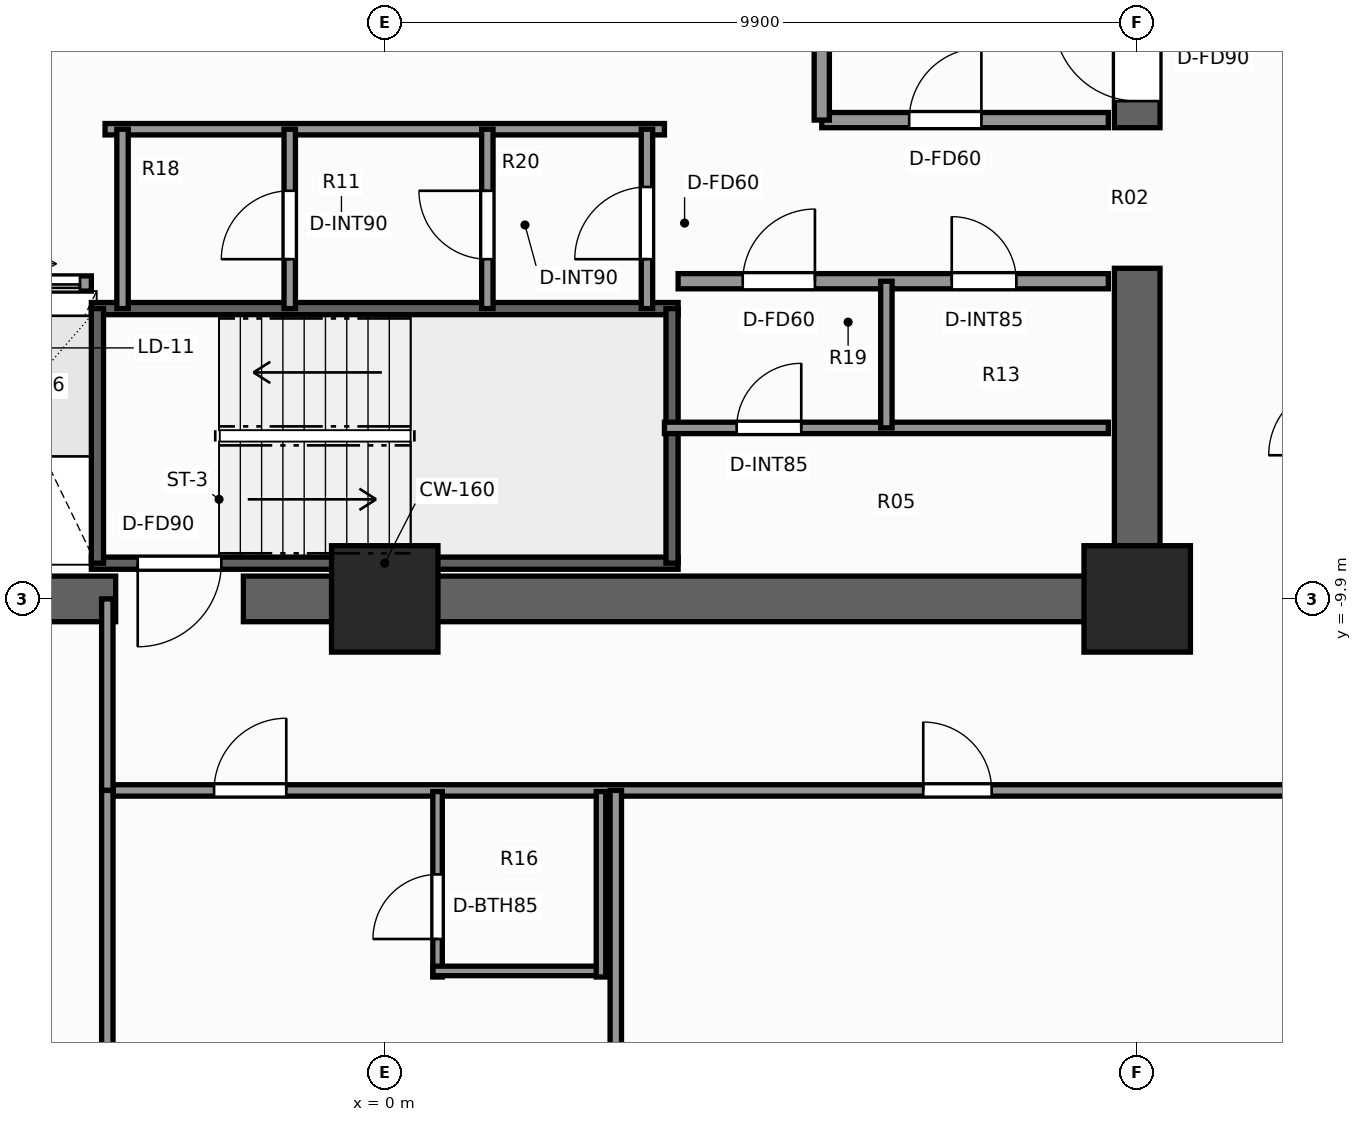
"""IFC4 building model, lengths in metres.
Left out: names, types, materials, properties, quantities, classifications, styles, units other than length and angle.
Written with IfcOpenShell. Run it as: python <this file> out.ifc"""

import sys

from ifc_helpers import new_model, si_unit, direction, frame, frame_2d, origin, origin_2d, place, context, subcontext, project, spatial, rectangle, extrude, element, fill, save


model = new_model("IFC4")
c1 = context("Model", 3, precision=1e-05, world=origin(), true_north=direction((0.0, 1.0)))
c2 = subcontext(c1, "Body", "Model", "MODEL_VIEW")
j1 = project(units=[si_unit("LENGTHUNIT", "METRE"), si_unit("PLANEANGLEUNIT", "RADIAN")], contexts=[c1])
p1 = place(None, origin())
s1 = spatial("IfcSite", under=j1, at=p1, CompositionType="ELEMENT")
p2 = place(p1, origin())
s2 = spatial("IfcBuilding", under=s1, at=p2, CompositionType="ELEMENT")
p3 = place(p2, frame((0.0, 0.0, 82.1)))
s3 = spatial("IfcBuildingStorey", under=s2, at=p3, CompositionType="ELEMENT", Elevation=82.1)
p4 = place(p3, frame((10.2, -9.9, 0.0), z_axis=(0.0, 0.0, 1.0), x_axis=(-1.0, 0.0, 0.0)))
e1 = element("IfcWall", 1, at=p4, inside=s3, PredefinedType="SHEAR", context=c2, shape_type="SweptSolid", body=[
    extrude(rectangle(XDim=12.06, YDim=0.6, at=frame_2d((6.03, 0.0))), origin(), (0.0, 0.0, 1.0), 3.3),
])
p5 = place(p3, frame((-3.54, -9.9, 0.0), z_axis=(0.0, 0.0, 1.0), x_axis=(-1.0, 0.0, 0.0)))
e2 = element("IfcWall", 2, at=p5, inside=s3, PredefinedType="SHEAR", context=c2, shape_type="SweptSolid", body=[
    extrude(rectangle(XDim=6.66, YDim=0.6, at=frame_2d((3.33, 0.0))), origin(), (0.0, 0.0, 1.0), 3.3),
])
p6 = place(p3, frame((9.9, -9.6, 0.0), z_axis=(0.0, 0.0, 1.0), x_axis=(0.0, 1.0, 0.0)))
e3 = element("IfcWall", 3, at=p6, inside=s3, PredefinedType="SHEAR", context=c2, shape_type="SweptSolid", body=[
    extrude(rectangle(XDim=4.05, YDim=0.6, at=frame_2d((2.025, 0.0))), origin(), (0.0, 0.0, 1.0), 3.3),
])
p7 = place(p3, frame((9.9, -3.7, 0.0), z_axis=(0.0, 0.0, 1.0), x_axis=(0.0, 1.0, 0.0)))
e4 = element("IfcWall", 4, at=p7, inside=s3, PredefinedType="SHEAR", context=c2, shape_type="SweptSolid", body=[
    extrude(rectangle(XDim=13.3, YDim=0.6, at=frame_2d((6.65, 0.0))), origin(), (0.0, 0.0, 1.0), 3.3),
])
p8 = place(p7, frame((0.35, 0.0, 0.0)))
e5 = element("IfcOpeningElement", 5, at=p8, cuts=e4, PredefinedType="OPENING", context=c2, shape_type="SweptSolid", body=[
    extrude(rectangle(XDim=1.1, YDim=2.2, at=frame_2d((0.55, 1.1))), frame((0.0, 0.31, 0.0), z_axis=(0.0, -1.0, 0.0), x_axis=(1.0, 0.0, 0.0)), (0.0, 0.0, 1.0), 0.62),
])
for number, where, z_axis, x_axis in (
    (6, (9.9, -9.9, 0.0), (0.0, 0.0, 1.0), (1.0, 0.0, 0.0)),
    (7, (0.0, -9.9, 0.0), (0.0, 0.0, 1.0), (1.0, 0.0, 0.0)),
):
    element("IfcColumn", number, at=place(p3, frame(where, z_axis=z_axis, x_axis=x_axis)), inside=s3, PredefinedType="COLUMN", context=c2, shape_type="SweptSolid", body=[
        extrude(rectangle(XDim=1.4, YDim=1.4, at=origin_2d()), origin(), (0.0, 0.0, 1.0), 3.3),
    ])
p9 = place(p3, frame((3.86, -9.43, 0.0), z_axis=(0.0, 0.0, 1.0), x_axis=(-1.0, 0.0, 0.0)))
e8 = element("IfcWall", 8, at=p9, inside=s3, PredefinedType="SHEAR", context=c2, shape_type="SweptSolid", body=[
    extrude(rectangle(XDim=7.72, YDim=0.16, at=frame_2d((3.86, 0.0))), origin(), (0.0, 0.0, 1.0), 3.3),
])
p10 = place(p9, frame((6.01, 0.0, 0.0)))
e9 = element("IfcOpeningElement", 9, at=p10, cuts=e8, PredefinedType="OPENING", context=c2, shape_type="SweptSolid", body=[
    extrude(rectangle(XDim=1.1, YDim=2.2, at=frame_2d((0.55, 1.1))), frame((0.0, 0.09, 0.0), z_axis=(0.0, -1.0, 0.0), x_axis=(1.0, 0.0, 0.0)), (0.0, 0.0, 1.0), 0.18),
])
p11 = place(p3, frame((-3.86, -6.08, 0.0), z_axis=(0.0, 0.0, 1.0), x_axis=(1.0, 0.0, 0.0)))
e10 = element("IfcWall", 10, at=p11, inside=s3, PredefinedType="SHEAR", context=c2, shape_type="SweptSolid", body=[
    extrude(rectangle(XDim=7.72, YDim=0.16, at=frame_2d((3.86, 0.0))), origin(), (0.0, 0.0, 1.0), 3.3),
])
for number, where, z_axis, x_axis in (
    (11, (-3.78, -9.43, 0.0), (0.0, 0.0, 1.0), (0.0, 1.0, 0.0)),
    (12, (3.78, -9.43, 0.0), (0.0, 0.0, 1.0), (0.0, 1.0, 0.0)),
):
    element("IfcWall", number, at=place(p3, frame(where, z_axis=z_axis, x_axis=x_axis)), inside=s3, PredefinedType="SHEAR", context=c2, shape_type="SweptSolid", body=[
        extrude(rectangle(XDim=3.35, YDim=0.16, at=frame_2d((1.675, 0.0))), origin(), (0.0, 0.0, 1.0), 3.3),
    ])
p12 = place(p3, frame((5.75, -3.6, 0.0), z_axis=(0.0, 0.0, 1.0), x_axis=(1.0, 0.0, 0.0)))
e13 = element("IfcWall", 13, at=p12, inside=s3, PredefinedType="SOLIDWALL", context=c2, shape_type="SweptSolid", body=[
    extrude(rectangle(XDim=3.77, YDim=0.2, at=frame_2d((1.885, 0.0))), origin(), (0.0, 0.0, 1.0), 3.08),
])
p13 = place(p12, frame((1.15, 0.0, 0.0)))
e14 = element("IfcOpeningElement", 14, at=p13, cuts=e13, PredefinedType="OPENING", context=c2, shape_type="SweptSolid", body=[
    extrude(rectangle(XDim=0.95, YDim=2.06, at=frame_2d((0.475, 1.03))), frame((0.0, 0.11, 0.0), z_axis=(0.0, -1.0, 0.0), x_axis=(1.0, 0.0, 0.0)), (0.0, 0.0, 1.0), 0.22),
])
p14 = place(p3, frame((5.75, -3.6, 0.0), z_axis=(0.0, 0.0, 1.0), x_axis=(0.0, 1.0, 0.0)))
e15 = element("IfcWall", 15, at=p14, inside=s3, PredefinedType="SOLIDWALL", context=c2, shape_type="SweptSolid", body=[
    extrude(rectangle(XDim=5.57, YDim=0.2, at=frame_2d((2.785, 0.0))), origin(), (0.0, 0.0, 1.0), 3.08),
])
p15 = place(p14, frame((2.75, 0.0, 0.0)))
e16 = element("IfcOpeningElement", 16, at=p15, cuts=e15, PredefinedType="OPENING", context=c2, shape_type="SweptSolid", body=[
    extrude(rectangle(XDim=1.1, YDim=2.2, at=frame_2d((0.55, 1.1))), frame((0.0, 0.11, 0.0), z_axis=(0.0, -1.0, 0.0), x_axis=(1.0, 0.0, 0.0)), (0.0, 0.0, 1.0), 0.22),
])
p16 = place(p3, frame((-9.52, -5.75, 0.0), z_axis=(0.0, 0.0, 1.0), x_axis=(1.0, 0.0, 0.0)))
e17 = element("IfcWall", 17, at=p16, inside=s3, PredefinedType="SOLIDWALL", context=c2, shape_type="SweptSolid", body=[
    extrude(rectangle(XDim=5.66, YDim=0.2, at=frame_2d((2.83, 0.0))), origin(), (0.0, 0.0, 1.0), 3.08),
])
p17 = place(p16, frame((0.55, 0.0, 0.0)))
e18 = element("IfcOpeningElement", 18, at=p17, cuts=e17, PredefinedType="OPENING", context=c2, shape_type="SweptSolid", body=[
    extrude(rectangle(XDim=1.1, YDim=2.2, at=frame_2d((0.55, 1.1))), frame((0.0, 0.11, 0.0), z_axis=(0.0, -1.0, 0.0), x_axis=(1.0, 0.0, 0.0)), (0.0, 0.0, 1.0), 0.22),
])
p18 = place(p16, frame((2.48, 0.0, 0.0)))
e19 = element("IfcOpeningElement", 19, at=p18, cuts=e17, PredefinedType="OPENING", context=c2, shape_type="SweptSolid", body=[
    extrude(rectangle(XDim=1.1, YDim=2.2, at=frame_2d((0.55, 1.1))), frame((0.0, 0.11, 0.0), z_axis=(0.0, -1.0, 0.0), x_axis=(1.0, 0.0, 0.0)), (0.0, 0.0, 1.0), 0.22),
])
p19 = place(p16, frame((4.41, 0.0, 0.0)))
e20 = element("IfcOpeningElement", 20, at=p19, cuts=e17, PredefinedType="OPENING", context=c2, shape_type="SweptSolid", body=[
    extrude(rectangle(XDim=1.1, YDim=2.2, at=frame_2d((0.55, 1.1))), frame((0.0, 0.11, 0.0), z_axis=(0.0, -1.0, 0.0), x_axis=(1.0, 0.0, 0.0)), (0.0, 0.0, 1.0), 0.22),
])
p20 = place(p3, frame((3.86, -5.72, 0.0), z_axis=(0.0, 0.0, 1.0), x_axis=(1.0, 0.0, 0.0)))
e21 = element("IfcWall", 21, at=p20, inside=s3, PredefinedType="SOLIDWALL", context=c2, shape_type="SweptSolid", body=[
    extrude(rectangle(XDim=5.66, YDim=0.2, at=frame_2d((2.83, 0.0))), origin(), (0.0, 0.0, 1.0), 3.08),
])
p21 = place(p20, frame((0.85, 0.0, 0.0)))
e22 = element("IfcOpeningElement", 22, at=p21, cuts=e21, PredefinedType="OPENING", context=c2, shape_type="SweptSolid", body=[
    extrude(rectangle(XDim=0.95, YDim=2.06, at=frame_2d((0.475, 1.03))), frame((0.0, 0.11, 0.0), z_axis=(0.0, -1.0, 0.0), x_axis=(1.0, 0.0, 0.0)), (0.0, 0.0, 1.0), 0.22),
])
p22 = place(p20, frame((3.6, 0.0, 0.0)))
e23 = element("IfcOpeningElement", 23, at=p22, cuts=e21, PredefinedType="OPENING", context=c2, shape_type="SweptSolid", body=[
    extrude(rectangle(XDim=0.85, YDim=2.03, at=frame_2d((0.425, 1.015))), frame((0.0, 0.11, 0.0), z_axis=(0.0, -1.0, 0.0), x_axis=(1.0, 0.0, 0.0)), (0.0, 0.0, 1.0), 0.22),
])
p23 = place(p3, frame((3.68, -7.65, 0.0), z_axis=(0.0, 0.0, 1.0), x_axis=(1.0, 0.0, 0.0)))
e24 = element("IfcWall", 24, at=p23, inside=s3, PredefinedType="PARTITIONING", context=c2, shape_type="SweptSolid", body=[
    extrude(rectangle(XDim=5.84, YDim=0.15, at=frame_2d((2.92, 0.0))), origin(), (0.0, 0.0, 1.0), 3.08),
])
p24 = place(p23, frame((0.95, 0.0, 0.0)))
e25 = element("IfcOpeningElement", 25, at=p24, cuts=e24, PredefinedType="OPENING", context=c2, shape_type="SweptSolid", body=[
    extrude(rectangle(XDim=0.85, YDim=2.03, at=frame_2d((0.425, 1.015))), frame((0.0, 0.085, 0.0), z_axis=(0.0, -1.0, 0.0), x_axis=(1.0, 0.0, 0.0)), (0.0, 0.0, 1.0), 0.17),
])
p25 = place(p3, frame((6.6, -7.65, 0.0), z_axis=(0.0, 0.0, 1.0), x_axis=(0.0, 1.0, 0.0)))
e26 = element("IfcWall", 26, at=p25, inside=s3, PredefinedType="PARTITIONING", context=c2, shape_type="SweptSolid", body=[
    extrude(rectangle(XDim=1.93, YDim=0.15, at=frame_2d((0.965, 0.0))), origin(), (0.0, 0.0, 1.0), 3.08),
])
p26 = place(p3, frame((-3.68, -3.72, 0.0), z_axis=(0.0, 0.0, 1.0), x_axis=(1.0, 0.0, 0.0)))
e27 = element("IfcWall", 27, at=p26, inside=s3, PredefinedType="PARTITIONING", context=c2, shape_type="SweptSolid", body=[
    extrude(rectangle(XDim=7.36, YDim=0.15, at=frame_2d((3.68, 0.0))), origin(), (0.0, 0.0, 1.0), 3.08),
])
p27 = place(p3, frame((3.45, -6.08, 0.0), z_axis=(0.0, 0.0, 1.0), x_axis=(0.0, 1.0, 0.0)))
e28 = element("IfcWall", 28, at=p27, inside=s3, PredefinedType="PARTITIONING", context=c2, shape_type="SweptSolid", body=[
    extrude(rectangle(XDim=2.36, YDim=0.15, at=frame_2d((1.18, 0.0))), origin(), (0.0, 0.0, 1.0), 3.08),
])
p28 = place(p27, frame((0.65, 0.0, 0.0)))
e29 = element("IfcOpeningElement", 29, at=p28, cuts=e28, PredefinedType="OPENING", context=c2, shape_type="SweptSolid", body=[
    extrude(rectangle(XDim=0.95, YDim=2.06, at=frame_2d((0.475, 1.03))), frame((0.0, 0.085, 0.0), z_axis=(0.0, -1.0, 0.0), x_axis=(1.0, 0.0, 0.0)), (0.0, 0.0, 1.0), 0.17),
])
p29 = place(p3, frame((-3.45, -6.08, 0.0), z_axis=(0.0, 0.0, 1.0), x_axis=(0.0, 1.0, 0.0)))
e30 = element("IfcWall", 30, at=p29, inside=s3, PredefinedType="PARTITIONING", context=c2, shape_type="SweptSolid", body=[
    extrude(rectangle(XDim=2.36, YDim=0.15, at=frame_2d((1.18, 0.0))), origin(), (0.0, 0.0, 1.0), 3.08),
])
p30 = place(p3, frame((1.35, -6.08, 0.0), z_axis=(0.0, 0.0, 1.0), x_axis=(0.0, 1.0, 0.0)))
e31 = element("IfcWall", 31, at=p30, inside=s3, PredefinedType="PARTITIONING", context=c2, shape_type="SweptSolid", body=[
    extrude(rectangle(XDim=2.36, YDim=0.15, at=frame_2d((1.18, 0.0))), origin(), (0.0, 0.0, 1.0), 3.08),
])
p31 = place(p30, frame((0.65, 0.0, 0.0)))
e32 = element("IfcOpeningElement", 32, at=p31, cuts=e31, PredefinedType="OPENING", context=c2, shape_type="SweptSolid", body=[
    extrude(rectangle(XDim=0.9, YDim=2.06, at=frame_2d((0.45, 1.03))), frame((0.0, 0.085, 0.0), z_axis=(0.0, -1.0, 0.0), x_axis=(1.0, 0.0, 0.0)), (0.0, 0.0, 1.0), 0.17),
])
p32 = place(p3, frame((-1.25, -6.08, 0.0), z_axis=(0.0, 0.0, 1.0), x_axis=(0.0, 1.0, 0.0)))
e33 = element("IfcWall", 33, at=p32, inside=s3, PredefinedType="PARTITIONING", context=c2, shape_type="SweptSolid", body=[
    extrude(rectangle(XDim=2.36, YDim=0.15, at=frame_2d((1.18, 0.0))), origin(), (0.0, 0.0, 1.0), 3.08),
])
p33 = place(p32, frame((0.65, 0.0, 0.0)))
e34 = element("IfcOpeningElement", 34, at=p33, cuts=e33, PredefinedType="OPENING", context=c2, shape_type="SweptSolid", body=[
    extrude(rectangle(XDim=0.9, YDim=2.06, at=frame_2d((0.45, 1.03))), frame((0.0, 0.085, 0.0), z_axis=(0.0, -1.0, 0.0), x_axis=(1.0, 0.0, 0.0)), (0.0, 0.0, 1.0), 0.17),
])
p34 = place(p3, frame((-3.65, -12.42, 0.0), z_axis=(0.0, 0.0, 1.0), x_axis=(1.0, 0.0, 0.0)))
e35 = element("IfcWall", 35, at=p34, inside=s3, PredefinedType="PARTITIONING", context=c2, shape_type="SweptSolid", body=[
    extrude(rectangle(XDim=16.23, YDim=0.15, at=frame_2d((8.115, 0.0))), origin(), (0.0, 0.0, 1.0), 2.292),
])
p35 = place(p34, frame((1.405, 0.0, 0.0)))
e36 = element("IfcOpeningElement", 36, at=p35, cuts=e35, PredefinedType="OPENING", context=c2, shape_type="SweptSolid", body=[
    extrude(rectangle(XDim=0.95, YDim=2.06, at=frame_2d((0.475, 1.03))), frame((0.0, 0.085, 0.0), z_axis=(0.0, -1.0, 0.0), x_axis=(1.0, 0.0, 0.0)), (0.0, 0.0, 1.0), 0.17),
])
p36 = place(p34, frame((10.735, 0.0, 0.0)))
e37 = element("IfcOpeningElement", 37, at=p36, cuts=e35, PredefinedType="OPENING", context=c2, shape_type="SweptSolid", body=[
    extrude(rectangle(XDim=0.9, YDim=2.06, at=frame_2d((0.45, 1.03))), frame((0.0, 0.085, 0.0), z_axis=(0.0, -1.0, 0.0), x_axis=(1.0, 0.0, 0.0)), (0.0, 0.0, 1.0), 0.17),
])
p37 = place(p3, frame((-3.65, -12.42, 0.0), z_axis=(0.0, 0.0, 1.0), x_axis=(0.0, 1.0, 0.0)))
e38 = element("IfcWall", 38, at=p37, inside=s3, PredefinedType="PARTITIONING", context=c2, shape_type="SweptSolid", body=[
    extrude(rectangle(XDim=2.52, YDim=0.15, at=frame_2d((1.26, 0.0))), origin(), (0.0, 0.0, 1.0), 3.08),
])
p38 = place(p3, frame((-3.65, -20.38, 0.0), z_axis=(0.0, 0.0, 1.0), x_axis=(0.0, 1.0, 0.0)))
e39 = element("IfcWall", 39, at=p38, inside=s3, PredefinedType="PARTITIONING", context=c2, shape_type="SweptSolid", body=[
    extrude(rectangle(XDim=7.96, YDim=0.15, at=frame_2d((3.98, 0.0))), origin(), (0.0, 0.0, 1.0), 2.449),
])
p39 = place(p3, frame((3.04, -20.38, 0.0), z_axis=(0.0, 0.0, 1.0), x_axis=(0.0, 1.0, 0.0)))
e40 = element("IfcWall", 40, at=p39, inside=s3, PredefinedType="PARTITIONING", context=c2, shape_type="SweptSolid", body=[
    extrude(rectangle(XDim=7.96, YDim=0.15, at=frame_2d((3.98, 0.0))), origin(), (0.0, 0.0, 1.0), 2.369),
])
p40 = place(p3, frame((0.695, -14.875, 0.0), z_axis=(0.0, 0.0, 1.0), x_axis=(0.0, 1.0, 0.0)))
e41 = element("IfcWall", 41, at=p40, inside=s3, PredefinedType="PARTITIONING", context=c2, shape_type="SweptSolid", body=[
    extrude(rectangle(XDim=2.44, YDim=0.125, at=frame_2d((1.22, 0.0))), origin(), (0.0, 0.0, 1.0), 3.08),
])
p41 = place(p40, frame((0.5, 0.0, 0.0)))
e42 = element("IfcOpeningElement", 42, at=p41, cuts=e41, PredefinedType="OPENING", context=c2, shape_type="SweptSolid", body=[
    extrude(rectangle(XDim=0.85, YDim=2.03, at=frame_2d((0.425, 1.015))), frame((0.0, 0.073, 0.0), z_axis=(0.0, -1.0, 0.0), x_axis=(1.0, 0.0, 0.0)), (0.0, 0.0, 1.0), 0.145),
])
p42 = place(p3, frame((0.635, -14.795, 0.0), z_axis=(0.0, 0.0, 1.0), x_axis=(1.0, 0.0, 0.0)))
e43 = element("IfcWall", 43, at=p42, inside=s3, PredefinedType="PARTITIONING", context=c2, shape_type="SweptSolid", body=[
    extrude(rectangle(XDim=2.27, YDim=0.125, at=frame_2d((1.135, 0.0))), origin(), (0.0, 0.0, 1.0), 3.08),
])
p43 = place(p3, frame((2.845, -14.875, 0.0), z_axis=(0.0, 0.0, 1.0), x_axis=(0.0, 1.0, 0.0)))
e44 = element("IfcWall", 44, at=p43, inside=s3, PredefinedType="PARTITIONING", context=c2, shape_type="SweptSolid", body=[
    extrude(rectangle(XDim=2.44, YDim=0.125, at=frame_2d((1.22, 0.0))), origin(), (0.0, 0.0, 1.0), 2.369),
])
p44 = place(p10, origin())
e45 = element("IfcDoor", 45, at=p44, inside=s3, OperationType="SINGLE_SWING_RIGHT", PredefinedType="DOOR", context=c2, shape_type="SweptSolid", body=[
    extrude(rectangle(XDim=1.1, YDim=2.2, at=frame_2d((0.55, 1.1))), frame((0.0, 0.025, 0.0), z_axis=(0.0, -1.0, 0.0), x_axis=(1.0, 0.0, 0.0)), (0.0, 0.0, 1.0), 0.05),
])
fill(e9, e45)
p45 = place(p8, origin())
e46 = element("IfcDoor", 46, at=p45, inside=s3, OperationType="SINGLE_SWING_RIGHT", PredefinedType="DOOR", context=c2, shape_type="SweptSolid", body=[
    extrude(rectangle(XDim=1.1, YDim=2.2, at=frame_2d((0.55, 1.1))), frame((0.0, 0.025, 0.0), z_axis=(0.0, -1.0, 0.0), x_axis=(1.0, 0.0, 0.0)), (0.0, 0.0, 1.0), 0.05),
])
fill(e5, e46)
p46 = place(p19, origin())
e47 = element("IfcDoor", 47, at=p46, inside=s3, OperationType="DOUBLE_DOOR_SLIDING", PredefinedType="DOOR", context=c2, shape_type="SweptSolid", body=[
    extrude(rectangle(XDim=1.1, YDim=2.2, at=frame_2d((0.55, 1.1))), frame((0.0, 0.025, 0.0), z_axis=(0.0, -1.0, 0.0), x_axis=(1.0, 0.0, 0.0)), (0.0, 0.0, 1.0), 0.05),
])
fill(e20, e47)
p47 = place(p21, origin())
e48 = element("IfcDoor", 48, at=p47, inside=s3, OperationType="SINGLE_SWING_RIGHT", PredefinedType="DOOR", context=c2, shape_type="SweptSolid", body=[
    extrude(rectangle(XDim=0.95, YDim=2.06, at=frame_2d((0.475, 1.03))), frame((0.0, 0.025, 0.0), z_axis=(0.0, -1.0, 0.0), x_axis=(1.0, 0.0, 0.0)), (0.0, 0.0, 1.0), 0.05),
])
fill(e22, e48)
p48 = place(p22, origin())
e49 = element("IfcDoor", 49, at=p48, inside=s3, OperationType="SINGLE_SWING_LEFT", PredefinedType="DOOR", context=c2, shape_type="SweptSolid", body=[
    extrude(rectangle(XDim=0.85, YDim=2.03, at=frame_2d((0.425, 1.015))), frame((0.0, 0.025, 0.0), z_axis=(0.0, -1.0, 0.0), x_axis=(1.0, 0.0, 0.0)), (0.0, 0.0, 1.0), 0.05),
])
fill(e23, e49)
p49 = place(p24, origin())
e50 = element("IfcDoor", 50, at=p49, inside=s3, OperationType="SINGLE_SWING_RIGHT", PredefinedType="DOOR", context=c2, shape_type="SweptSolid", body=[
    extrude(rectangle(XDim=0.85, YDim=2.03, at=frame_2d((0.425, 1.015))), frame((0.0, 0.025, 0.0), z_axis=(0.0, -1.0, 0.0), x_axis=(1.0, 0.0, 0.0)), (0.0, 0.0, 1.0), 0.05),
])
fill(e25, e50)
p50 = place(p13, origin())
e51 = element("IfcDoor", 51, at=p50, inside=s3, OperationType="SINGLE_SWING_RIGHT", PredefinedType="DOOR", context=c2, shape_type="SweptSolid", body=[
    extrude(rectangle(XDim=0.95, YDim=2.06, at=frame_2d((0.475, 1.03))), frame((0.0, 0.025, 0.0), z_axis=(0.0, -1.0, 0.0), x_axis=(1.0, 0.0, 0.0)), (0.0, 0.0, 1.0), 0.05),
])
fill(e14, e51)
p51 = place(p28, origin())
e52 = element("IfcDoor", 52, at=p51, inside=s3, OperationType="SINGLE_SWING_LEFT", PredefinedType="DOOR", context=c2, shape_type="SweptSolid", body=[
    extrude(rectangle(XDim=0.95, YDim=2.06, at=frame_2d((0.475, 1.03))), frame((0.0, 0.025, 0.0), z_axis=(0.0, -1.0, 0.0), x_axis=(1.0, 0.0, 0.0)), (0.0, 0.0, 1.0), 0.05),
])
fill(e29, e52)
p52 = place(p31, origin())
e53 = element("IfcDoor", 53, at=p52, inside=s3, OperationType="SINGLE_SWING_RIGHT", PredefinedType="DOOR", context=c2, shape_type="SweptSolid", body=[
    extrude(rectangle(XDim=0.9, YDim=2.06, at=frame_2d((0.45, 1.03))), frame((0.0, 0.025, 0.0), z_axis=(0.0, -1.0, 0.0), x_axis=(1.0, 0.0, 0.0)), (0.0, 0.0, 1.0), 0.05),
])
fill(e32, e53)
p53 = place(p33, origin())
e54 = element("IfcDoor", 54, at=p53, inside=s3, OperationType="SINGLE_SWING_LEFT", PredefinedType="DOOR", context=c2, shape_type="SweptSolid", body=[
    extrude(rectangle(XDim=0.9, YDim=2.06, at=frame_2d((0.45, 1.03))), frame((0.0, 0.025, 0.0), z_axis=(0.0, -1.0, 0.0), x_axis=(1.0, 0.0, 0.0)), (0.0, 0.0, 1.0), 0.05),
])
fill(e34, e54)
p54 = place(p41, origin())
e55 = element("IfcDoor", 55, at=p54, inside=s3, OperationType="SINGLE_SWING_LEFT", PredefinedType="DOOR", context=c2, shape_type="SweptSolid", body=[
    extrude(rectangle(XDim=0.85, YDim=2.03, at=frame_2d((0.425, 1.015))), frame((0.0, 0.025, 0.0), z_axis=(0.0, -1.0, 0.0), x_axis=(1.0, 0.0, 0.0)), (0.0, 0.0, 1.0), 0.05),
])
fill(e42, e55)
p55 = place(p35, origin())
e56 = element("IfcDoor", 56, at=p55, inside=s3, OperationType="SINGLE_SWING_RIGHT", PredefinedType="DOOR", context=c2, shape_type="SweptSolid", body=[
    extrude(rectangle(XDim=0.95, YDim=2.06, at=frame_2d((0.475, 1.03))), frame((0.0, 0.025, 0.0), z_axis=(0.0, -1.0, 0.0), x_axis=(1.0, 0.0, 0.0)), (0.0, 0.0, 1.0), 0.05),
])
fill(e36, e56)
p56 = place(p36, origin())
e57 = element("IfcDoor", 57, at=p56, inside=s3, OperationType="SINGLE_SWING_LEFT", PredefinedType="DOOR", context=c2, shape_type="SweptSolid", body=[
    extrude(rectangle(XDim=0.9, YDim=2.06, at=frame_2d((0.45, 1.03))), frame((0.0, 0.025, 0.0), z_axis=(0.0, -1.0, 0.0), x_axis=(1.0, 0.0, 0.0)), (0.0, 0.0, 1.0), 0.05),
])
fill(e37, e57)
save(model, sys.argv[1])
